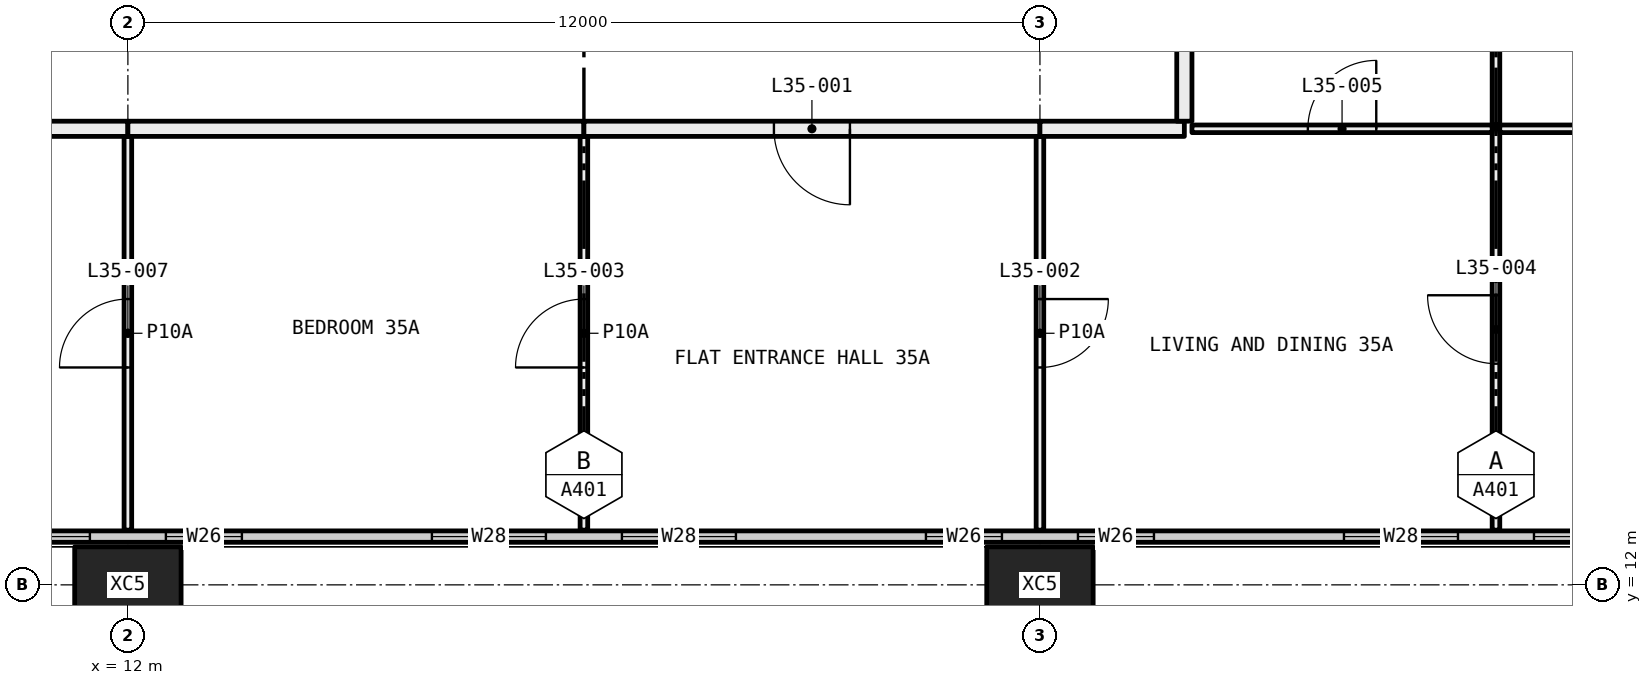
"""IFC4 building model, lengths in metres.
Left out: names, types, materials, properties, quantities, classifications, styles, units other than length and angle.
Written with IfcOpenShell. Run it as: python <this file> out.ifc"""

import sys

from ifc_helpers import new_model, si_unit, direction, frame, frame_2d, origin, origin_2d, place, context, subcontext, project, spatial, rectangle, hollow_rectangle, extrude, element, fill, save


model = new_model("IFC4")
c1 = context("Model", 3, precision=1e-05, world=origin(), true_north=direction((0.0, 1.0)))
c2 = subcontext(c1, "Body", "Model", "MODEL_VIEW")
j1 = project(units=[si_unit("LENGTHUNIT", "METRE"), si_unit("PLANEANGLEUNIT", "RADIAN")], contexts=[c1])
p1 = place(None, origin())
s1 = spatial("IfcSite", under=j1, at=p1, CompositionType="ELEMENT")
p2 = place(p1, origin())
s2 = spatial("IfcBuilding", under=s1, at=p2, CompositionType="ELEMENT")
p3 = place(p2, frame((0.0, 0.0, 134.55)))
s3 = spatial("IfcBuildingStorey", under=s2, at=p3, CompositionType="ELEMENT", Elevation=134.55)
for number, where, z_axis, x_axis in (
    (1, (12.0, 12.0, -0.4), (0.0, 0.0, 1.0), (1.0, 0.0, 0.0)),
    (2, (24.0, 12.0, -0.4), (0.0, 0.0, 1.0), (1.0, 0.0, 0.0)),
):
    element("IfcColumn", number, at=place(p3, frame(where, z_axis=z_axis, x_axis=x_axis)), inside=s3, PredefinedType="COLUMN", context=c2, shape_type="SweptSolid", body=[
        extrude(hollow_rectangle(XDim=1.4, YDim=1.0, WallThickness=0.055, at=origin_2d()), origin(), (0.0, 0.0, 1.0), 3.45),
    ])
p4 = place(p3, frame((6.56, 12.635, 0.0), z_axis=(0.0, 0.0, 1.0), x_axis=(1.0, 0.0, 0.0)))
e3 = element("IfcWall", 3, at=p4, inside=s3, PredefinedType="ELEMENTEDWALL", context=c2, shape_type="SweptSolid", body=[
    extrude(rectangle(XDim=58.88, YDim=0.15, at=frame_2d((29.44, 0.0))), origin(), (0.0, 0.0, 1.0), 3.05),
])
p5 = place(p4, frame((0.44, 0.0, 0.45)))
e4 = element("IfcOpeningElement", 4, at=p5, cuts=e3, PredefinedType="OPENING", context=c2, shape_type="SweptSolid", body=[
    extrude(rectangle(XDim=4.5, YDim=2.55, at=frame_2d((2.25, 1.275))), frame((0.0, 0.085, 0.0), z_axis=(0.0, -1.0, 0.0), x_axis=(1.0, 0.0, 0.0)), (0.0, 0.0, 1.0), 0.17),
])
p6 = place(p4, frame((5.94, 0.0, 0.45)))
e5 = element("IfcOpeningElement", 5, at=p6, cuts=e3, PredefinedType="OPENING", context=c2, shape_type="SweptSolid", body=[
    extrude(rectangle(XDim=1.0, YDim=2.55, at=frame_2d((0.5, 1.275))), frame((0.0, 0.085, 0.0), z_axis=(0.0, -1.0, 0.0), x_axis=(1.0, 0.0, 0.0)), (0.0, 0.0, 1.0), 0.17),
])
p7 = place(p4, frame((9.44, 0.0, 0.45)))
e6 = element("IfcOpeningElement", 6, at=p7, cuts=e3, PredefinedType="OPENING", context=c2, shape_type="SweptSolid", body=[
    extrude(rectangle(XDim=1.5, YDim=2.55, at=frame_2d((0.75, 1.275))), frame((0.0, 0.085, 0.0), z_axis=(0.0, -1.0, 0.0), x_axis=(1.0, 0.0, 0.0)), (0.0, 0.0, 1.0), 0.17),
])
p8 = place(p4, frame((11.94, 0.0, 0.45)))
e7 = element("IfcOpeningElement", 7, at=p8, cuts=e3, PredefinedType="OPENING", context=c2, shape_type="SweptSolid", body=[
    extrude(rectangle(XDim=1.5, YDim=2.55, at=frame_2d((0.75, 1.275))), frame((0.0, 0.085, 0.0), z_axis=(0.0, -1.0, 0.0), x_axis=(1.0, 0.0, 0.0)), (0.0, 0.0, 1.0), 0.17),
])
p9 = place(p4, frame((15.94, 0.0, 0.45)))
e8 = element("IfcOpeningElement", 8, at=p9, cuts=e3, PredefinedType="OPENING", context=c2, shape_type="SweptSolid", body=[
    extrude(rectangle(XDim=1.0, YDim=2.55, at=frame_2d((0.5, 1.275))), frame((0.0, 0.085, 0.0), z_axis=(0.0, -1.0, 0.0), x_axis=(1.0, 0.0, 0.0)), (0.0, 0.0, 1.0), 0.17),
])
p10 = place(p4, frame((17.94, 0.0, 0.45)))
e9 = element("IfcOpeningElement", 9, at=p10, cuts=e3, PredefinedType="OPENING", context=c2, shape_type="SweptSolid", body=[
    extrude(rectangle(XDim=1.0, YDim=2.55, at=frame_2d((0.5, 1.275))), frame((0.0, 0.085, 0.0), z_axis=(0.0, -1.0, 0.0), x_axis=(1.0, 0.0, 0.0)), (0.0, 0.0, 1.0), 0.17),
])
p11 = place(p4, frame((21.44, 0.0, 0.45)))
e10 = element("IfcOpeningElement", 10, at=p11, cuts=e3, PredefinedType="OPENING", context=c2, shape_type="SweptSolid", body=[
    extrude(rectangle(XDim=1.5, YDim=2.55, at=frame_2d((0.75, 1.275))), frame((0.0, 0.085, 0.0), z_axis=(0.0, -1.0, 0.0), x_axis=(1.0, 0.0, 0.0)), (0.0, 0.0, 1.0), 0.17),
])
p12 = place(p4, frame((23.94, 0.0, 0.45)))
e11 = element("IfcOpeningElement", 11, at=p12, cuts=e3, PredefinedType="OPENING", context=c2, shape_type="SweptSolid", body=[
    extrude(rectangle(XDim=1.5, YDim=2.55, at=frame_2d((0.75, 1.275))), frame((0.0, 0.085, 0.0), z_axis=(0.0, -1.0, 0.0), x_axis=(1.0, 0.0, 0.0)), (0.0, 0.0, 1.0), 0.17),
])
p13 = place(p4, frame((27.94, 0.0, 0.45)))
e12 = element("IfcOpeningElement", 12, at=p13, cuts=e3, PredefinedType="OPENING", context=c2, shape_type="SweptSolid", body=[
    extrude(rectangle(XDim=1.0, YDim=2.55, at=frame_2d((0.5, 1.275))), frame((0.0, 0.085, 0.0), z_axis=(0.0, -1.0, 0.0), x_axis=(1.0, 0.0, 0.0)), (0.0, 0.0, 1.0), 0.17),
])
p14 = place(p4, frame((29.94, 0.0, 0.45)))
e13 = element("IfcOpeningElement", 13, at=p14, cuts=e3, PredefinedType="OPENING", context=c2, shape_type="SweptSolid", body=[
    extrude(rectangle(XDim=1.0, YDim=2.55, at=frame_2d((0.5, 1.275))), frame((0.0, 0.085, 0.0), z_axis=(0.0, -1.0, 0.0), x_axis=(1.0, 0.0, 0.0)), (0.0, 0.0, 1.0), 0.17),
])
p15 = place(p4, frame((33.44, 0.0, 0.45)))
e14 = element("IfcOpeningElement", 14, at=p15, cuts=e3, PredefinedType="OPENING", context=c2, shape_type="SweptSolid", body=[
    extrude(rectangle(XDim=1.5, YDim=2.55, at=frame_2d((0.75, 1.275))), frame((0.0, 0.085, 0.0), z_axis=(0.0, -1.0, 0.0), x_axis=(1.0, 0.0, 0.0)), (0.0, 0.0, 1.0), 0.17),
])
p16 = place(p4, frame((35.94, 0.0, 0.45)))
e15 = element("IfcOpeningElement", 15, at=p16, cuts=e3, PredefinedType="OPENING", context=c2, shape_type="SweptSolid", body=[
    extrude(rectangle(XDim=1.5, YDim=2.55, at=frame_2d((0.75, 1.275))), frame((0.0, 0.085, 0.0), z_axis=(0.0, -1.0, 0.0), x_axis=(1.0, 0.0, 0.0)), (0.0, 0.0, 1.0), 0.17),
])
p17 = place(p4, frame((39.94, 0.0, 0.45)))
e16 = element("IfcOpeningElement", 16, at=p17, cuts=e3, PredefinedType="OPENING", context=c2, shape_type="SweptSolid", body=[
    extrude(rectangle(XDim=1.0, YDim=2.55, at=frame_2d((0.5, 1.275))), frame((0.0, 0.085, 0.0), z_axis=(0.0, -1.0, 0.0), x_axis=(1.0, 0.0, 0.0)), (0.0, 0.0, 1.0), 0.17),
])
p18 = place(p4, frame((41.94, 0.0, 0.45)))
e17 = element("IfcOpeningElement", 17, at=p18, cuts=e3, PredefinedType="OPENING", context=c2, shape_type="SweptSolid", body=[
    extrude(rectangle(XDim=1.0, YDim=2.55, at=frame_2d((0.5, 1.275))), frame((0.0, 0.085, 0.0), z_axis=(0.0, -1.0, 0.0), x_axis=(1.0, 0.0, 0.0)), (0.0, 0.0, 1.0), 0.17),
])
p19 = place(p4, frame((45.44, 0.0, 0.45)))
e18 = element("IfcOpeningElement", 18, at=p19, cuts=e3, PredefinedType="OPENING", context=c2, shape_type="SweptSolid", body=[
    extrude(rectangle(XDim=1.5, YDim=2.55, at=frame_2d((0.75, 1.275))), frame((0.0, 0.085, 0.0), z_axis=(0.0, -1.0, 0.0), x_axis=(1.0, 0.0, 0.0)), (0.0, 0.0, 1.0), 0.17),
])
p20 = place(p4, frame((47.94, 0.0, 0.45)))
e19 = element("IfcOpeningElement", 19, at=p20, cuts=e3, PredefinedType="OPENING", context=c2, shape_type="SweptSolid", body=[
    extrude(rectangle(XDim=1.5, YDim=2.55, at=frame_2d((0.75, 1.275))), frame((0.0, 0.085, 0.0), z_axis=(0.0, -1.0, 0.0), x_axis=(1.0, 0.0, 0.0)), (0.0, 0.0, 1.0), 0.17),
])
p21 = place(p4, frame((51.94, 0.0, 0.45)))
e20 = element("IfcOpeningElement", 20, at=p21, cuts=e3, PredefinedType="OPENING", context=c2, shape_type="SweptSolid", body=[
    extrude(rectangle(XDim=1.0, YDim=2.55, at=frame_2d((0.5, 1.275))), frame((0.0, 0.085, 0.0), z_axis=(0.0, -1.0, 0.0), x_axis=(1.0, 0.0, 0.0)), (0.0, 0.0, 1.0), 0.17),
])
p22 = place(p4, frame((53.94, 0.0, 0.45)))
e21 = element("IfcOpeningElement", 21, at=p22, cuts=e3, PredefinedType="OPENING", context=c2, shape_type="SweptSolid", body=[
    extrude(rectangle(XDim=4.5, YDim=2.55, at=frame_2d((2.25, 1.275))), frame((0.0, 0.085, 0.0), z_axis=(0.0, -1.0, 0.0), x_axis=(1.0, 0.0, 0.0)), (0.0, 0.0, 1.0), 0.17),
])
p23 = place(p3, frame((12.0, 12.72, 0.0), z_axis=(0.0, 0.0, 1.0), x_axis=(0.0, 1.0, 0.0)))
e22 = element("IfcWall", 22, at=p23, inside=s3, PredefinedType="PARTITIONING", context=c2, shape_type="SweptSolid", body=[
    extrude(rectangle(XDim=5.18, YDim=0.1, at=frame_2d((2.59, 0.0))), origin(), (0.0, 0.0, 1.0), 3.05),
])
p24 = place(p23, frame((2.14, 0.0, 0.0)))
e23 = element("IfcOpeningElement", 23, at=p24, cuts=e22, PredefinedType="OPENING", context=c2, shape_type="SweptSolid", body=[
    extrude(rectangle(XDim=0.9, YDim=2.1, at=frame_2d((0.45, 1.05))), frame((0.0, 0.06, 0.0), z_axis=(0.0, -1.0, 0.0), x_axis=(1.0, 0.0, 0.0)), (0.0, 0.0, 1.0), 0.12),
])
p25 = place(p3, frame((12.0, 18.0, 0.0), z_axis=(0.0, 0.0, 1.0), x_axis=(-1.0, 0.0, 0.0)))
e24 = element("IfcWall", 24, at=p25, inside=s3, PredefinedType="PARTITIONING", context=c2, shape_type="SweptSolid", body=[
    extrude(rectangle(XDim=1.9, YDim=0.2, at=frame_2d((0.95, 0.0))), origin(), (0.0, 0.0, 1.0), 3.05),
])
p26 = place(p3, frame((18.0, 12.72, 0.0), z_axis=(0.0, 0.0, 1.0), x_axis=(0.0, 1.0, 0.0)))
e25 = element("IfcWall", 25, at=p26, inside=s3, PredefinedType="PARTITIONING", context=c2, shape_type="SweptSolid", body=[
    extrude(rectangle(XDim=5.18, YDim=0.1, at=frame_2d((2.59, 0.0))), origin(), (0.0, 0.0, 1.0), 3.05),
])
p27 = place(p26, frame((2.14, 0.0, 0.0)))
e26 = element("IfcOpeningElement", 26, at=p27, cuts=e25, PredefinedType="OPENING", context=c2, shape_type="SweptSolid", body=[
    extrude(rectangle(XDim=0.9, YDim=2.1, at=frame_2d((0.45, 1.05))), frame((0.0, 0.06, 0.0), z_axis=(0.0, -1.0, 0.0), x_axis=(1.0, 0.0, 0.0)), (0.0, 0.0, 1.0), 0.12),
])
p28 = place(p3, frame((18.0, 18.0, 0.0), z_axis=(0.0, 0.0, 1.0), x_axis=(-1.0, 0.0, 0.0)))
e27 = element("IfcWall", 27, at=p28, inside=s3, PredefinedType="PARTITIONING", context=c2, shape_type="SweptSolid", body=[
    extrude(rectangle(XDim=6.0, YDim=0.2, at=frame_2d((3.0, 0.0))), origin(), (0.0, 0.0, 1.0), 3.05),
])
p29 = place(p3, frame((24.0, 12.72, 0.0), z_axis=(0.0, 0.0, 1.0), x_axis=(0.0, 1.0, 0.0)))
e28 = element("IfcWall", 28, at=p29, inside=s3, PredefinedType="PARTITIONING", context=c2, shape_type="SweptSolid", body=[
    extrude(rectangle(XDim=5.18, YDim=0.1, at=frame_2d((2.59, 0.0))), origin(), (0.0, 0.0, 1.0), 3.05),
])
p30 = place(p29, frame((2.14, 0.0, 0.0)))
e29 = element("IfcOpeningElement", 29, at=p30, cuts=e28, PredefinedType="OPENING", context=c2, shape_type="SweptSolid", body=[
    extrude(rectangle(XDim=0.9, YDim=2.1, at=frame_2d((0.45, 1.05))), frame((0.0, 0.06, 0.0), z_axis=(0.0, -1.0, 0.0), x_axis=(1.0, 0.0, 0.0)), (0.0, 0.0, 1.0), 0.12),
])
p31 = place(p3, frame((24.0, 18.0, 0.0), z_axis=(0.0, 0.0, 1.0), x_axis=(-1.0, 0.0, 0.0)))
e30 = element("IfcWall", 30, at=p31, inside=s3, PredefinedType="PARTITIONING", context=c2, shape_type="SweptSolid", body=[
    extrude(rectangle(XDim=6.0, YDim=0.2, at=frame_2d((3.0, 0.0))), origin(), (0.0, 0.0, 1.0), 3.05),
])
p32 = place(p31, frame((2.5, 0.0, 0.0)))
e31 = element("IfcOpeningElement", 31, at=p32, cuts=e30, PredefinedType="OPENING", context=c2, shape_type="SweptSolid", body=[
    extrude(rectangle(XDim=1.0, YDim=2.1, at=frame_2d((0.5, 1.05))), frame((0.0, 0.11, 0.0), z_axis=(0.0, -1.0, 0.0), x_axis=(1.0, 0.0, 0.0)), (0.0, 0.0, 1.0), 0.22),
])
p33 = place(p3, frame((30.0, 12.72, 0.0), z_axis=(0.0, 0.0, 1.0), x_axis=(0.0, 1.0, 0.0)))
e32 = element("IfcWall", 32, at=p33, inside=s3, PredefinedType="PARTITIONING", context=c2, shape_type="SweptSolid", body=[
    extrude(rectangle(XDim=5.28, YDim=0.1, at=frame_2d((2.64, 0.0))), origin(), (0.0, 0.0, 1.0), 3.05),
])
p34 = place(p33, frame((2.19, 0.0, 0.0)))
e33 = element("IfcOpeningElement", 33, at=p34, cuts=e32, PredefinedType="OPENING", context=c2, shape_type="SweptSolid", body=[
    extrude(rectangle(XDim=0.9, YDim=2.1, at=frame_2d((0.45, 1.05))), frame((0.0, 0.06, 0.0), z_axis=(0.0, -1.0, 0.0), x_axis=(1.0, 0.0, 0.0)), (0.0, 0.0, 1.0), 0.12),
])
p35 = place(p3, frame((29.95, 18.0, 0.0), z_axis=(0.0, 0.0, 1.0), x_axis=(-1.0, 0.0, 0.0)))
e34 = element("IfcWall", 34, at=p35, inside=s3, PredefinedType="PARTITIONING", context=c2, shape_type="SweptSolid", body=[
    extrude(rectangle(XDim=3.95, YDim=0.1, at=frame_2d((1.975, 0.0))), origin(), (0.0, 0.0, 1.0), 3.05),
])
p36 = place(p35, frame((1.525, 0.0, 0.0)))
e35 = element("IfcOpeningElement", 35, at=p36, cuts=e34, PredefinedType="OPENING", context=c2, shape_type="SweptSolid", body=[
    extrude(rectangle(XDim=0.9, YDim=2.1, at=frame_2d((0.45, 1.05))), frame((0.0, 0.06, 0.0), z_axis=(0.0, -1.0, 0.0), x_axis=(1.0, 0.0, 0.0)), (0.0, 0.0, 1.0), 0.12),
])
p37 = place(p3, frame((25.9, 18.0, 0.0), z_axis=(0.0, 0.0, 1.0), x_axis=(-1.0, 0.0, 0.0)))
e36 = element("IfcWall", 36, at=p37, inside=s3, PredefinedType="PARTITIONING", context=c2, shape_type="SweptSolid", body=[
    extrude(rectangle(XDim=1.9, YDim=0.2, at=frame_2d((0.95, 0.0))), origin(), (0.0, 0.0, 1.0), 3.05),
])
p38 = place(p3, frame((34.5, 18.0, 0.0), z_axis=(0.0, 0.0, 1.0), x_axis=(-1.0, 0.0, 0.0)))
e37 = element("IfcWall", 37, at=p38, inside=s3, PredefinedType="PARTITIONING", context=c2, shape_type="SweptSolid", body=[
    extrude(rectangle(XDim=4.45, YDim=0.1, at=frame_2d((2.225, 0.0))), origin(), (0.0, 0.0, 1.0), 3.05),
])
p39 = place(p3, frame((30.0, 18.05, 0.0), z_axis=(0.0, 0.0, 1.0), x_axis=(0.0, 1.0, 0.0)))
e38 = element("IfcWall", 38, at=p39, inside=s3, PredefinedType="PARTITIONING", context=c2, shape_type="SweptSolid", body=[
    extrude(rectangle(XDim=6.175, YDim=0.1, at=frame_2d((3.087, 0.0))), origin(), (0.0, 0.0, 1.0), 2.45),
])
p40 = place(p39, frame((2.637, 0.0, 0.0)))
e39 = element("IfcOpeningElement", 39, at=p40, cuts=e38, PredefinedType="OPENING", context=c2, shape_type="SweptSolid", body=[
    extrude(rectangle(XDim=0.9, YDim=2.1, at=frame_2d((0.45, 1.05))), frame((0.0, 0.06, 0.0), z_axis=(0.0, -1.0, 0.0), x_axis=(1.0, 0.0, 0.0)), (0.0, 0.0, 1.0), 0.12),
])
p41 = place(p3, frame((25.9, 23.9, 0.0), z_axis=(0.0, 0.0, 1.0), x_axis=(0.0, -1.0, 0.0)))
e40 = element("IfcWall", 40, at=p41, inside=s3, PredefinedType="PARTITIONING", context=c2, shape_type="SweptSolid", body=[
    extrude(rectangle(XDim=5.8, YDim=0.2, at=frame_2d((2.9, 0.0))), origin(), (0.0, 0.0, 1.0), 3.05),
])
p42 = place(p5, origin())
e41 = element("IfcWindow", 41, at=p42, inside=s3, PartitioningType="SINGLE_PANEL", PredefinedType="WINDOW", context=c2, shape_type="SweptSolid", body=[
    extrude(rectangle(XDim=4.5, YDim=2.55, at=frame_2d((2.25, 1.275))), frame((0.0, 0.03, 0.0), z_axis=(0.0, -1.0, 0.0), x_axis=(1.0, 0.0, 0.0)), (0.0, 0.0, 1.0), 0.06),
])
fill(e4, e41)
p43 = place(p6, origin())
e42 = element("IfcWindow", 42, at=p43, inside=s3, PartitioningType="SINGLE_PANEL", PredefinedType="WINDOW", context=c2, shape_type="SweptSolid", body=[
    extrude(rectangle(XDim=1.0, YDim=2.55, at=frame_2d((0.5, 1.275))), frame((0.0, 0.03, 0.0), z_axis=(0.0, -1.0, 0.0), x_axis=(1.0, 0.0, 0.0)), (0.0, 0.0, 1.0), 0.06),
])
fill(e5, e42)
p44 = place(p7, origin())
e43 = element("IfcWindow", 43, at=p44, inside=s3, PartitioningType="SINGLE_PANEL", PredefinedType="WINDOW", context=c2, shape_type="SweptSolid", body=[
    extrude(rectangle(XDim=1.5, YDim=2.55, at=frame_2d((0.75, 1.275))), frame((0.0, 0.03, 0.0), z_axis=(0.0, -1.0, 0.0), x_axis=(1.0, 0.0, 0.0)), (0.0, 0.0, 1.0), 0.06),
])
fill(e6, e43)
p45 = place(p8, origin())
e44 = element("IfcWindow", 44, at=p45, inside=s3, PartitioningType="SINGLE_PANEL", PredefinedType="WINDOW", context=c2, shape_type="SweptSolid", body=[
    extrude(rectangle(XDim=1.5, YDim=2.55, at=frame_2d((0.75, 1.275))), frame((0.0, 0.03, 0.0), z_axis=(0.0, -1.0, 0.0), x_axis=(1.0, 0.0, 0.0)), (0.0, 0.0, 1.0), 0.06),
])
fill(e7, e44)
p46 = place(p9, origin())
e45 = element("IfcWindow", 45, at=p46, inside=s3, PartitioningType="SINGLE_PANEL", PredefinedType="WINDOW", context=c2, shape_type="SweptSolid", body=[
    extrude(rectangle(XDim=1.0, YDim=2.55, at=frame_2d((0.5, 1.275))), frame((0.0, 0.03, 0.0), z_axis=(0.0, -1.0, 0.0), x_axis=(1.0, 0.0, 0.0)), (0.0, 0.0, 1.0), 0.06),
])
fill(e8, e45)
p47 = place(p10, origin())
e46 = element("IfcWindow", 46, at=p47, inside=s3, PartitioningType="SINGLE_PANEL", PredefinedType="WINDOW", context=c2, shape_type="SweptSolid", body=[
    extrude(rectangle(XDim=1.0, YDim=2.55, at=frame_2d((0.5, 1.275))), frame((0.0, 0.03, 0.0), z_axis=(0.0, -1.0, 0.0), x_axis=(1.0, 0.0, 0.0)), (0.0, 0.0, 1.0), 0.06),
])
fill(e9, e46)
p48 = place(p11, origin())
e47 = element("IfcWindow", 47, at=p48, inside=s3, PartitioningType="SINGLE_PANEL", PredefinedType="WINDOW", context=c2, shape_type="SweptSolid", body=[
    extrude(rectangle(XDim=1.5, YDim=2.55, at=frame_2d((0.75, 1.275))), frame((0.0, 0.03, 0.0), z_axis=(0.0, -1.0, 0.0), x_axis=(1.0, 0.0, 0.0)), (0.0, 0.0, 1.0), 0.06),
])
fill(e10, e47)
p49 = place(p12, origin())
e48 = element("IfcWindow", 48, at=p49, inside=s3, PartitioningType="SINGLE_PANEL", PredefinedType="WINDOW", context=c2, shape_type="SweptSolid", body=[
    extrude(rectangle(XDim=1.5, YDim=2.55, at=frame_2d((0.75, 1.275))), frame((0.0, 0.03, 0.0), z_axis=(0.0, -1.0, 0.0), x_axis=(1.0, 0.0, 0.0)), (0.0, 0.0, 1.0), 0.06),
])
fill(e11, e48)
p50 = place(p32, origin())
e49 = element("IfcDoor", 49, at=p50, inside=s3, OperationType="SINGLE_SWING_RIGHT", PredefinedType="DOOR", context=c2, shape_type="SweptSolid", body=[
    extrude(rectangle(XDim=1.0, YDim=2.1, at=frame_2d((0.5, 1.05))), frame((0.0, 0.025, 0.0), z_axis=(0.0, -1.0, 0.0), x_axis=(1.0, 0.0, 0.0)), (0.0, 0.0, 1.0), 0.05),
])
fill(e31, e49)
p51 = place(p30, frame((0.9, 0.0, 0.0), x_axis=(-1.0, 0.0, 0.0)))
e50 = element("IfcDoor", 50, at=p51, inside=s3, OperationType="SINGLE_SWING_RIGHT", PredefinedType="DOOR", context=c2, shape_type="SweptSolid", body=[
    extrude(rectangle(XDim=0.9, YDim=2.1, at=frame_2d((0.45, 1.05))), frame((0.0, 0.025, 0.0), z_axis=(0.0, -1.0, 0.0), x_axis=(1.0, 0.0, 0.0)), (0.0, 0.0, 1.0), 0.05),
])
fill(e29, e50)
p52 = place(p27, origin())
e51 = element("IfcDoor", 51, at=p52, inside=s3, OperationType="SINGLE_SWING_RIGHT", PredefinedType="DOOR", context=c2, shape_type="SweptSolid", body=[
    extrude(rectangle(XDim=0.9, YDim=2.1, at=frame_2d((0.45, 1.05))), frame((0.0, 0.025, 0.0), z_axis=(0.0, -1.0, 0.0), x_axis=(1.0, 0.0, 0.0)), (0.0, 0.0, 1.0), 0.05),
])
fill(e26, e51)
p53 = place(p34, origin())
e52 = element("IfcDoor", 52, at=p53, inside=s3, OperationType="SINGLE_SWING_LEFT", PredefinedType="DOOR", context=c2, shape_type="SweptSolid", body=[
    extrude(rectangle(XDim=0.9, YDim=2.1, at=frame_2d((0.45, 1.05))), frame((0.0, 0.025, 0.0), z_axis=(0.0, -1.0, 0.0), x_axis=(1.0, 0.0, 0.0)), (0.0, 0.0, 1.0), 0.05),
])
fill(e33, e52)
p54 = place(p36, frame((0.9, 0.0, 0.0), x_axis=(-1.0, 0.0, 0.0)))
e53 = element("IfcDoor", 53, at=p54, inside=s3, OperationType="SINGLE_SWING_LEFT", PredefinedType="DOOR", context=c2, shape_type="SweptSolid", body=[
    extrude(rectangle(XDim=0.9, YDim=2.1, at=frame_2d((0.45, 1.05))), frame((0.0, 0.025, 0.0), z_axis=(0.0, -1.0, 0.0), x_axis=(1.0, 0.0, 0.0)), (0.0, 0.0, 1.0), 0.05),
])
fill(e35, e53)
p55 = place(p24, origin())
e54 = element("IfcDoor", 54, at=p55, inside=s3, OperationType="SINGLE_SWING_RIGHT", PredefinedType="DOOR", context=c2, shape_type="SweptSolid", body=[
    extrude(rectangle(XDim=0.9, YDim=2.1, at=frame_2d((0.45, 1.05))), frame((0.0, 0.025, 0.0), z_axis=(0.0, -1.0, 0.0), x_axis=(1.0, 0.0, 0.0)), (0.0, 0.0, 1.0), 0.05),
])
fill(e23, e54)
save(model, sys.argv[1])
